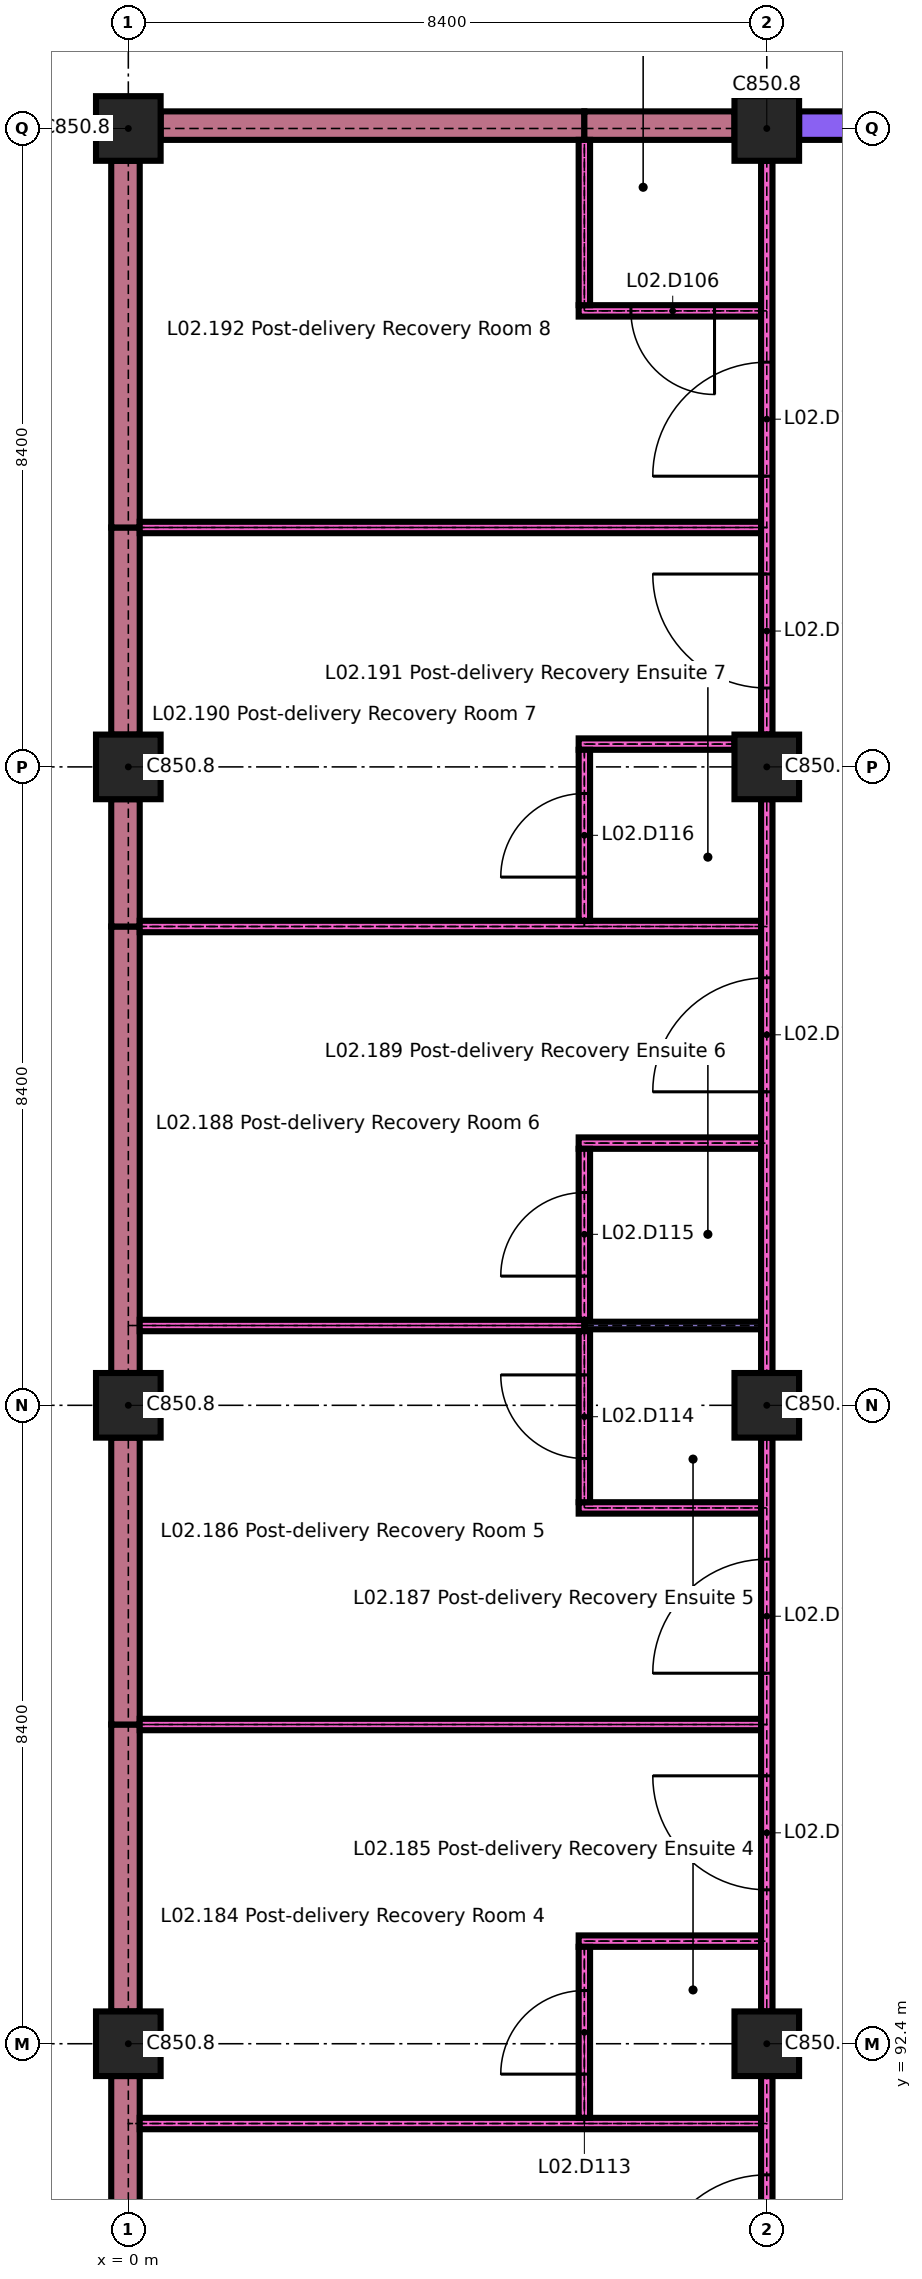
"""IFC4 building model, lengths in metres.
Left out: names, types, materials, properties, quantities, classifications, styles, units other than length and angle.
Written with IfcOpenShell. Run it as: python <this file> out.ifc"""

import sys

from ifc_helpers import new_model, si_unit, direction, frame, frame_2d, origin, origin_2d, place, context, subcontext, project, spatial, rectangle, extrude, element, fill, save


model = new_model("IFC4")
c1 = context("Model", 3, precision=1e-05, world=origin(), true_north=direction((0.0, 1.0)))
c2 = subcontext(c1, "Body", "Model", "MODEL_VIEW")
j1 = project(units=[si_unit("LENGTHUNIT", "METRE"), si_unit("PLANEANGLEUNIT", "RADIAN")], contexts=[c1])
p1 = place(None, origin())
s1 = spatial("IfcSite", under=j1, at=p1, CompositionType="ELEMENT")
p2 = place(p1, origin())
s2 = spatial("IfcBuilding", under=s1, at=p2, CompositionType="ELEMENT")
p3 = place(p2, frame((0.0, 0.0, 8.4)))
s3 = spatial("IfcBuildingStorey", under=s2, at=p3, CompositionType="ELEMENT", Elevation=8.4)
for number, where, z_axis, x_axis in (
    (1, (0.0, 92.4, 0.0), (0.0, 0.0, 1.0), (1.0, 0.0, 0.0)),
    (2, (8.4, 92.4, 0.0), (0.0, 0.0, 1.0), (1.0, 0.0, 0.0)),
    (3, (0.0, 100.8, 0.0), (0.0, 0.0, 1.0), (1.0, 0.0, 0.0)),
    (4, (8.4, 100.8, 0.0), (0.0, 0.0, 1.0), (1.0, 0.0, 0.0)),
    (5, (0.0, 109.2, 0.0), (0.0, 0.0, 1.0), (1.0, 0.0, 0.0)),
    (6, (8.4, 109.2, 0.0), (0.0, 0.0, 1.0), (1.0, 0.0, 0.0)),
    (7, (0.0, 117.6, 0.0), (0.0, 0.0, 1.0), (1.0, 0.0, 0.0)),
    (8, (8.4, 117.6, 0.0), (0.0, 0.0, 1.0), (1.0, 0.0, 0.0)),
):
    element("IfcColumn", number, at=place(p3, frame(where, z_axis=z_axis, x_axis=x_axis)), inside=s3, PredefinedType="COLUMN", context=c2, shape_type="SweptSolid", body=[
        extrude(rectangle(XDim=0.85, YDim=0.85, at=origin_2d()), origin(), (0.0, 0.0, 1.0), 4.2),
    ])
p4 = place(p3, frame((0.425, 117.637, 0.0), z_axis=(0.0, 0.0, 1.0), x_axis=(1.0, 0.0, 0.0)))
e9 = element("IfcWall", 9, at=p4, inside=s3, PredefinedType="SOLIDWALL", context=c2, shape_type="SweptSolid", body=[
    extrude(rectangle(XDim=5.575, YDim=0.375, at=frame_2d((2.788, 0.0))), origin(), (0.0, 0.0, 1.0), 3.9),
])
p5 = place(p3, frame((6.0, 117.637, 0.0), z_axis=(0.0, 0.0, 1.0), x_axis=(1.0, 0.0, 0.0)))
e10 = element("IfcWall", 10, at=p5, inside=s3, PredefinedType="SOLIDWALL", context=c2, shape_type="SweptSolid", body=[
    extrude(rectangle(XDim=1.975, YDim=0.375, at=frame_2d((0.988, 0.0))), origin(), (0.0, 0.0, 1.0), 3.9),
])
p6 = place(p3, frame((8.825, 117.637, 0.0), z_axis=(0.0, 0.0, 1.0), x_axis=(1.0, 0.0, 0.0)))
e11 = element("IfcWall", 11, at=p6, inside=s3, PredefinedType="SOLIDWALL", context=c2, shape_type="SweptSolid", body=[
    extrude(rectangle(XDim=2.575, YDim=0.375, at=frame_2d((1.288, 0.0))), origin(), (0.0, 0.0, 1.0), 4.2),
])
p7 = place(p6, frame((1.225, 0.0, 0.9)))
e12 = element("IfcOpeningElement", 12, at=p7, cuts=e11, PredefinedType="OPENING", context=c2, shape_type="SweptSolid", body=[
    extrude(rectangle(XDim=0.9, YDim=2.1, at=frame_2d((0.45, 1.05))), frame((0.0, 0.198, 0.0), z_axis=(0.0, -1.0, 0.0), x_axis=(1.0, 0.0, 0.0)), (0.0, 0.0, 1.0), 0.395),
])
p8 = place(p3, frame((-0.038, 86.1, 0.0), z_axis=(0.0, 0.0, 1.0), x_axis=(0.0, 1.0, 0.0)))
e13 = element("IfcWall", 13, at=p8, inside=s3, PredefinedType="SOLIDWALL", context=c2, shape_type="SweptSolid", body=[
    extrude(rectangle(XDim=5.875, YDim=0.375, at=frame_2d((2.938, 0.0))), origin(), (0.0, 0.0, 1.0), 3.9),
])
p9 = place(p3, frame((-0.038, 92.825, 0.0), z_axis=(0.0, 0.0, 1.0), x_axis=(0.0, 1.0, 0.0)))
e14 = element("IfcWall", 14, at=p9, inside=s3, PredefinedType="SOLIDWALL", context=c2, shape_type="SweptSolid", body=[
    extrude(rectangle(XDim=3.775, YDim=0.375, at=frame_2d((1.888, 0.0))), origin(), (0.0, 0.0, 1.0), 3.9),
])
p10 = place(p3, frame((-0.038, 96.6, 0.0), z_axis=(0.0, 0.0, 1.0), x_axis=(0.0, 1.0, 0.0)))
e15 = element("IfcWall", 15, at=p10, inside=s3, PredefinedType="SOLIDWALL", context=c2, shape_type="SweptSolid", body=[
    extrude(rectangle(XDim=3.775, YDim=0.375, at=frame_2d((1.887, 0.0))), origin(), (0.0, 0.0, 1.0), 3.9),
])
p11 = place(p3, frame((-0.038, 101.225, 0.0), z_axis=(0.0, 0.0, 1.0), x_axis=(0.0, 1.0, 0.0)))
e16 = element("IfcWall", 16, at=p11, inside=s3, PredefinedType="SOLIDWALL", context=c2, shape_type="SweptSolid", body=[
    extrude(rectangle(XDim=5.875, YDim=0.375, at=frame_2d((2.938, 0.0))), origin(), (0.0, 0.0, 1.0), 3.9),
])
p12 = place(p3, frame((-0.038, 107.1, 0.0), z_axis=(0.0, 0.0, 1.0), x_axis=(0.0, 1.0, 0.0)))
e17 = element("IfcWall", 17, at=p12, inside=s3, PredefinedType="SOLIDWALL", context=c2, shape_type="SweptSolid", body=[
    extrude(rectangle(XDim=1.675, YDim=0.375, at=frame_2d((0.837, 0.0))), origin(), (0.0, 0.0, 1.0), 3.9),
])
p13 = place(p3, frame((-0.038, 109.625, 0.0), z_axis=(0.0, 0.0, 1.0), x_axis=(0.0, 1.0, 0.0)))
e18 = element("IfcWall", 18, at=p13, inside=s3, PredefinedType="SOLIDWALL", context=c2, shape_type="SweptSolid", body=[
    extrude(rectangle(XDim=2.725, YDim=0.375, at=frame_2d((1.363, 0.0))), origin(), (0.0, 0.0, 1.0), 3.9),
])
p14 = place(p3, frame((-0.038, 112.35, 0.0), z_axis=(0.0, 0.0, 1.0), x_axis=(0.0, 1.0, 0.0)))
e19 = element("IfcWall", 19, at=p14, inside=s3, PredefinedType="SOLIDWALL", context=c2, shape_type="SweptSolid", body=[
    extrude(rectangle(XDim=4.825, YDim=0.375, at=frame_2d((2.413, 0.0))), origin(), (0.0, 0.0, 1.0), 3.9),
])
p15 = place(p3, frame((0.15, 91.35, 0.0), z_axis=(0.0, 0.0, 1.0), x_axis=(1.0, 0.0, 0.0)))
e20 = element("IfcWall", 20, at=p15, inside=s3, PredefinedType="PARTITIONING", context=c2, shape_type="SweptSolid", body=[
    extrude(rectangle(XDim=8.175, YDim=0.15, at=frame_2d((4.087, 0.0))), origin(), (0.0, 0.0, 1.0), 4.2),
])
p16 = place(p3, frame((5.925, 93.75, 0.0), z_axis=(0.0, 0.0, 1.0), x_axis=(1.0, 0.0, 0.0)))
e21 = element("IfcWall", 21, at=p16, inside=s3, PredefinedType="PARTITIONING", context=c2, shape_type="SweptSolid", body=[
    extrude(rectangle(XDim=2.4, YDim=0.15, at=frame_2d((1.2, 0.0))), origin(), (0.0, 0.0, 1.0), 4.2),
])
p17 = place(p3, frame((0.15, 96.6, 0.0), z_axis=(0.0, 0.0, 1.0), x_axis=(1.0, 0.0, 0.0)))
e22 = element("IfcWall", 22, at=p17, inside=s3, PredefinedType="PARTITIONING", context=c2, shape_type="SweptSolid", body=[
    extrude(rectangle(XDim=8.175, YDim=0.15, at=frame_2d((4.087, 0.0))), origin(), (0.0, 0.0, 1.0), 4.2),
])
p18 = place(p3, frame((5.925, 99.45, 0.0), z_axis=(0.0, 0.0, 1.0), x_axis=(1.0, 0.0, 0.0)))
e23 = element("IfcWall", 23, at=p18, inside=s3, PredefinedType="PARTITIONING", context=c2, shape_type="SweptSolid", body=[
    extrude(rectangle(XDim=2.4, YDim=0.15, at=frame_2d((1.2, 0.0))), origin(), (0.0, 0.0, 1.0), 4.2),
])
p19 = place(p3, frame((0.15, 101.85, 0.0), z_axis=(0.0, 0.0, 1.0), x_axis=(1.0, 0.0, 0.0)))
e24 = element("IfcWall", 24, at=p19, inside=s3, PredefinedType="PARTITIONING", context=c2, shape_type="SweptSolid", body=[
    extrude(rectangle(XDim=5.85, YDim=0.15, at=frame_2d((2.925, 0.0))), origin(), (0.0, 0.0, 1.0), 4.2),
])
p20 = place(p3, frame((6.0, 101.85, 0.0), z_axis=(0.0, 0.0, 1.0), x_axis=(1.0, 0.0, 0.0)))
e25 = element("IfcWall", 25, at=p20, inside=s3, PredefinedType="PARTITIONING", context=c2, shape_type="SweptSolid", body=[
    extrude(rectangle(XDim=2.325, YDim=0.1, at=frame_2d((1.163, 0.0))), origin(), (0.0, 0.0, 1.0), 4.2),
])
p21 = place(p3, frame((5.925, 104.25, 0.0), z_axis=(0.0, 0.0, 1.0), x_axis=(1.0, 0.0, 0.0)))
e26 = element("IfcWall", 26, at=p21, inside=s3, PredefinedType="PARTITIONING", context=c2, shape_type="SweptSolid", body=[
    extrude(rectangle(XDim=2.4, YDim=0.15, at=frame_2d((1.2, 0.0))), origin(), (0.0, 0.0, 1.0), 4.2),
])
p22 = place(p3, frame((0.15, 107.1, 0.0), z_axis=(0.0, 0.0, 1.0), x_axis=(1.0, 0.0, 0.0)))
e27 = element("IfcWall", 27, at=p22, inside=s3, PredefinedType="PARTITIONING", context=c2, shape_type="SweptSolid", body=[
    extrude(rectangle(XDim=8.175, YDim=0.15, at=frame_2d((4.087, 0.0))), origin(), (0.0, 0.0, 1.0), 4.2),
])
p23 = place(p3, frame((5.925, 109.5, 0.0), z_axis=(0.0, 0.0, 1.0), x_axis=(1.0, 0.0, 0.0)))
e28 = element("IfcWall", 28, at=p23, inside=s3, PredefinedType="PARTITIONING", context=c2, shape_type="SweptSolid", body=[
    extrude(rectangle(XDim=2.05, YDim=0.15, at=frame_2d((1.025, 0.0))), origin(), (0.0, 0.0, 1.0), 4.2),
])
p24 = place(p3, frame((0.15, 112.35, 0.0), z_axis=(0.0, 0.0, 1.0), x_axis=(1.0, 0.0, 0.0)))
e29 = element("IfcWall", 29, at=p24, inside=s3, PredefinedType="PARTITIONING", context=c2, shape_type="SweptSolid", body=[
    extrude(rectangle(XDim=8.175, YDim=0.15, at=frame_2d((4.087, 0.0))), origin(), (0.0, 0.0, 1.0), 4.2),
])
p25 = place(p3, frame((5.925, 115.2, 0.0), z_axis=(0.0, 0.0, 1.0), x_axis=(1.0, 0.0, 0.0)))
e30 = element("IfcWall", 30, at=p25, inside=s3, PredefinedType="PARTITIONING", context=c2, shape_type="SweptSolid", body=[
    extrude(rectangle(XDim=2.4, YDim=0.15, at=frame_2d((1.2, 0.0))), origin(), (0.0, 0.0, 1.0), 4.2),
])
p26 = place(p25, frame((0.688, 0.0, 0.0)))
e31 = element("IfcOpeningElement", 31, at=p26, cuts=e30, PredefinedType="OPENING", context=c2, shape_type="SweptSolid", body=[
    extrude(rectangle(XDim=1.1, YDim=2.1, at=frame_2d((0.55, 1.05))), frame((0.0, 0.085, 0.0), z_axis=(0.0, -1.0, 0.0), x_axis=(1.0, 0.0, 0.0)), (0.0, 0.0, 1.0), 0.17),
])
p27 = place(p3, frame((6.0, 91.425, 0.0), z_axis=(0.0, 0.0, 1.0), x_axis=(0.0, 1.0, 0.0)))
e32 = element("IfcWall", 32, at=p27, inside=s3, PredefinedType="PARTITIONING", context=c2, shape_type="SweptSolid", body=[
    extrude(rectangle(XDim=2.25, YDim=0.15, at=frame_2d((1.125, 0.0))), origin(), (0.0, 0.0, 1.0), 4.2),
])
p28 = place(p27, frame((0.575, 0.0, 0.0)))
e33 = element("IfcOpeningElement", 33, at=p28, cuts=e32, PredefinedType="OPENING", context=c2, shape_type="SweptSolid", body=[
    extrude(rectangle(XDim=1.1, YDim=2.1, at=frame_2d((0.55, 1.05))), frame((0.0, 0.085, 0.0), z_axis=(0.0, -1.0, 0.0), x_axis=(1.0, 0.0, 0.0)), (0.0, 0.0, 1.0), 0.17),
])
p29 = place(p3, frame((6.0, 99.525, 0.0), z_axis=(0.0, 0.0, 1.0), x_axis=(0.0, 1.0, 0.0)))
e34 = element("IfcWall", 34, at=p29, inside=s3, PredefinedType="PARTITIONING", context=c2, shape_type="SweptSolid", body=[
    extrude(rectangle(XDim=2.25, YDim=0.15, at=frame_2d((1.125, 0.0))), origin(), (0.0, 0.0, 1.0), 4.2),
])
p30 = place(p29, frame((0.575, 0.0, 0.0)))
e35 = element("IfcOpeningElement", 35, at=p30, cuts=e34, PredefinedType="OPENING", context=c2, shape_type="SweptSolid", body=[
    extrude(rectangle(XDim=1.1, YDim=2.1, at=frame_2d((0.55, 1.05))), frame((0.0, 0.085, 0.0), z_axis=(0.0, -1.0, 0.0), x_axis=(1.0, 0.0, 0.0)), (0.0, 0.0, 1.0), 0.17),
])
p31 = place(p3, frame((6.0, 101.925, 0.0), z_axis=(0.0, 0.0, 1.0), x_axis=(0.0, 1.0, 0.0)))
e36 = element("IfcWall", 36, at=p31, inside=s3, PredefinedType="PARTITIONING", context=c2, shape_type="SweptSolid", body=[
    extrude(rectangle(XDim=2.25, YDim=0.15, at=frame_2d((1.125, 0.0))), origin(), (0.0, 0.0, 1.0), 4.2),
])
p32 = place(p31, frame((0.575, 0.0, 0.0)))
e37 = element("IfcOpeningElement", 37, at=p32, cuts=e36, PredefinedType="OPENING", context=c2, shape_type="SweptSolid", body=[
    extrude(rectangle(XDim=1.1, YDim=2.1, at=frame_2d((0.55, 1.05))), frame((0.0, 0.085, 0.0), z_axis=(0.0, -1.0, 0.0), x_axis=(1.0, 0.0, 0.0)), (0.0, 0.0, 1.0), 0.17),
])
p33 = place(p3, frame((6.0, 107.175, 0.0), z_axis=(0.0, 0.0, 1.0), x_axis=(0.0, 1.0, 0.0)))
e38 = element("IfcWall", 38, at=p33, inside=s3, PredefinedType="PARTITIONING", context=c2, shape_type="SweptSolid", body=[
    extrude(rectangle(XDim=2.25, YDim=0.15, at=frame_2d((1.125, 0.0))), origin(), (0.0, 0.0, 1.0), 4.2),
])
p34 = place(p33, frame((0.575, 0.0, 0.0)))
e39 = element("IfcOpeningElement", 39, at=p34, cuts=e38, PredefinedType="OPENING", context=c2, shape_type="SweptSolid", body=[
    extrude(rectangle(XDim=1.1, YDim=2.1, at=frame_2d((0.55, 1.05))), frame((0.0, 0.085, 0.0), z_axis=(0.0, -1.0, 0.0), x_axis=(1.0, 0.0, 0.0)), (0.0, 0.0, 1.0), 0.17),
])
p35 = place(p3, frame((6.0, 115.275, 0.0), z_axis=(0.0, 0.0, 1.0), x_axis=(0.0, 1.0, 0.0)))
e40 = element("IfcWall", 40, at=p35, inside=s3, PredefinedType="PARTITIONING", context=c2, shape_type="SweptSolid", body=[
    extrude(rectangle(XDim=2.175, YDim=0.15, at=frame_2d((1.087, 0.0))), origin(), (0.0, 0.0, 1.0), 4.2),
])
p36 = place(p3, frame((8.4, 84.425, 0.0), z_axis=(0.0, 0.0, 1.0), x_axis=(0.0, 1.0, 0.0)))
e41 = element("IfcWall", 41, at=p36, inside=s3, PredefinedType="PARTITIONING", context=c2, shape_type="SweptSolid", body=[
    extrude(rectangle(XDim=7.55, YDim=0.15, at=frame_2d((3.775, 0.0))), origin(), (0.0, 0.0, 1.0), 4.2),
])
p37 = place(p36, frame((4.75, 0.0, 0.0)))
e42 = element("IfcOpeningElement", 42, at=p37, cuts=e41, PredefinedType="OPENING", context=c2, shape_type="SweptSolid", body=[
    extrude(rectangle(XDim=1.5, YDim=2.4, at=frame_2d((0.75, 1.2))), frame((0.0, 0.085, 0.0), z_axis=(0.0, -1.0, 0.0), x_axis=(1.0, 0.0, 0.0)), (0.0, 0.0, 1.0), 0.17),
])
p38 = place(p3, frame((8.4, 92.825, 0.0), z_axis=(0.0, 0.0, 1.0), x_axis=(0.0, 1.0, 0.0)))
e43 = element("IfcWall", 43, at=p38, inside=s3, PredefinedType="PARTITIONING", context=c2, shape_type="SweptSolid", body=[
    extrude(rectangle(XDim=7.55, YDim=0.15, at=frame_2d((3.775, 0.0))), origin(), (0.0, 0.0, 1.0), 4.2),
])
p39 = place(p38, frame((1.6, 0.0, 0.0)))
e44 = element("IfcOpeningElement", 44, at=p39, cuts=e43, PredefinedType="OPENING", context=c2, shape_type="SweptSolid", body=[
    extrude(rectangle(XDim=1.5, YDim=2.4, at=frame_2d((0.75, 1.2))), frame((0.0, 0.085, 0.0), z_axis=(0.0, -1.0, 0.0), x_axis=(1.0, 0.0, 0.0)), (0.0, 0.0, 1.0), 0.17),
])
p40 = place(p38, frame((4.45, 0.0, 0.0)))
e45 = element("IfcOpeningElement", 45, at=p40, cuts=e43, PredefinedType="OPENING", context=c2, shape_type="SweptSolid", body=[
    extrude(rectangle(XDim=1.5, YDim=2.4, at=frame_2d((0.75, 1.2))), frame((0.0, 0.085, 0.0), z_axis=(0.0, -1.0, 0.0), x_axis=(1.0, 0.0, 0.0)), (0.0, 0.0, 1.0), 0.17),
])
p41 = place(p3, frame((8.4, 101.225, 0.0), z_axis=(0.0, 0.0, 1.0), x_axis=(0.0, 1.0, 0.0)))
e46 = element("IfcWall", 46, at=p41, inside=s3, PredefinedType="PARTITIONING", context=c2, shape_type="SweptSolid", body=[
    extrude(rectangle(XDim=7.55, YDim=0.15, at=frame_2d((3.775, 0.0))), origin(), (0.0, 0.0, 1.0), 4.2),
])
p42 = place(p41, frame((3.7, 0.0, 0.0)))
e47 = element("IfcOpeningElement", 47, at=p42, cuts=e46, PredefinedType="OPENING", context=c2, shape_type="SweptSolid", body=[
    extrude(rectangle(XDim=1.5, YDim=2.4, at=frame_2d((0.75, 1.2))), frame((0.0, 0.085, 0.0), z_axis=(0.0, -1.0, 0.0), x_axis=(1.0, 0.0, 0.0)), (0.0, 0.0, 1.0), 0.17),
])
p43 = place(p3, frame((8.4, 109.625, 0.0), z_axis=(0.0, 0.0, 1.0), x_axis=(0.0, 1.0, 0.0)))
e48 = element("IfcWall", 48, at=p43, inside=s3, PredefinedType="PARTITIONING", context=c2, shape_type="SweptSolid", body=[
    extrude(rectangle(XDim=7.55, YDim=0.15, at=frame_2d((3.775, 0.0))), origin(), (0.0, 0.0, 1.0), 4.2),
])
p44 = place(p43, frame((0.613, 0.0, 0.0)))
e49 = element("IfcOpeningElement", 49, at=p44, cuts=e48, PredefinedType="OPENING", context=c2, shape_type="SweptSolid", body=[
    extrude(rectangle(XDim=1.5, YDim=2.4, at=frame_2d((0.75, 1.2))), frame((0.0, 0.085, 0.0), z_axis=(0.0, -1.0, 0.0), x_axis=(1.0, 0.0, 0.0)), (0.0, 0.0, 1.0), 0.17),
])
p45 = place(p43, frame((3.4, 0.0, 0.0)))
e50 = element("IfcOpeningElement", 50, at=p45, cuts=e48, PredefinedType="OPENING", context=c2, shape_type="SweptSolid", body=[
    extrude(rectangle(XDim=1.5, YDim=2.4, at=frame_2d((0.75, 1.2))), frame((0.0, 0.085, 0.0), z_axis=(0.0, -1.0, 0.0), x_axis=(1.0, 0.0, 0.0)), (0.0, 0.0, 1.0), 0.17),
])
p46 = place(p26, origin())
e51 = element("IfcDoor", 51, at=p46, inside=s3, OperationType="SINGLE_SWING_RIGHT", PredefinedType="DOOR", context=c2, shape_type="SweptSolid", body=[
    extrude(rectangle(XDim=1.1, YDim=2.1, at=frame_2d((0.55, 1.05))), frame((0.0, 0.025, 0.0), z_axis=(0.0, -1.0, 0.0), x_axis=(1.0, 0.0, 0.0)), (0.0, 0.0, 1.0), 0.05),
])
fill(e31, e51)
p47 = place(p28, origin())
e52 = element("IfcDoor", 52, at=p47, inside=s3, OperationType="SINGLE_SWING_RIGHT", PredefinedType="DOOR", context=c2, shape_type="SweptSolid", body=[
    extrude(rectangle(XDim=1.1, YDim=2.1, at=frame_2d((0.55, 1.05))), frame((0.0, 0.025, 0.0), z_axis=(0.0, -1.0, 0.0), x_axis=(1.0, 0.0, 0.0)), (0.0, 0.0, 1.0), 0.05),
])
fill(e33, e52)
p48 = place(p30, origin())
e53 = element("IfcDoor", 53, at=p48, inside=s3, OperationType="SINGLE_SWING_LEFT", PredefinedType="DOOR", context=c2, shape_type="SweptSolid", body=[
    extrude(rectangle(XDim=1.1, YDim=2.1, at=frame_2d((0.55, 1.05))), frame((0.0, 0.025, 0.0), z_axis=(0.0, -1.0, 0.0), x_axis=(1.0, 0.0, 0.0)), (0.0, 0.0, 1.0), 0.05),
])
fill(e35, e53)
p49 = place(p32, origin())
e54 = element("IfcDoor", 54, at=p49, inside=s3, OperationType="SINGLE_SWING_RIGHT", PredefinedType="DOOR", context=c2, shape_type="SweptSolid", body=[
    extrude(rectangle(XDim=1.1, YDim=2.1, at=frame_2d((0.55, 1.05))), frame((0.0, 0.025, 0.0), z_axis=(0.0, -1.0, 0.0), x_axis=(1.0, 0.0, 0.0)), (0.0, 0.0, 1.0), 0.05),
])
fill(e37, e54)
p50 = place(p34, origin())
e55 = element("IfcDoor", 55, at=p50, inside=s3, OperationType="SINGLE_SWING_RIGHT", PredefinedType="DOOR", context=c2, shape_type="SweptSolid", body=[
    extrude(rectangle(XDim=1.1, YDim=2.1, at=frame_2d((0.55, 1.05))), frame((0.0, 0.025, 0.0), z_axis=(0.0, -1.0, 0.0), x_axis=(1.0, 0.0, 0.0)), (0.0, 0.0, 1.0), 0.05),
])
fill(e39, e55)
p51 = place(p37, origin())
e56 = element("IfcDoor", 56, at=p51, inside=s3, OperationType="SINGLE_SWING_RIGHT", PredefinedType="DOOR", context=c2, shape_type="SweptSolid", body=[
    extrude(rectangle(XDim=1.5, YDim=2.4, at=frame_2d((0.75, 1.2))), frame((0.0, 0.03, 0.0), z_axis=(0.0, -1.0, 0.0), x_axis=(1.0, 0.0, 0.0)), (0.0, 0.0, 1.0), 0.06),
])
fill(e42, e56)
p52 = place(p39, origin())
e57 = element("IfcDoor", 57, at=p52, inside=s3, OperationType="SINGLE_SWING_LEFT", PredefinedType="DOOR", context=c2, shape_type="SweptSolid", body=[
    extrude(rectangle(XDim=1.5, YDim=2.4, at=frame_2d((0.75, 1.2))), frame((0.0, 0.03, 0.0), z_axis=(0.0, -1.0, 0.0), x_axis=(1.0, 0.0, 0.0)), (0.0, 0.0, 1.0), 0.06),
])
fill(e44, e57)
p53 = place(p40, origin())
e58 = element("IfcDoor", 58, at=p53, inside=s3, OperationType="SINGLE_SWING_RIGHT", PredefinedType="DOOR", context=c2, shape_type="SweptSolid", body=[
    extrude(rectangle(XDim=1.5, YDim=2.4, at=frame_2d((0.75, 1.2))), frame((0.0, 0.03, 0.0), z_axis=(0.0, -1.0, 0.0), x_axis=(1.0, 0.0, 0.0)), (0.0, 0.0, 1.0), 0.06),
])
fill(e45, e58)
p54 = place(p42, origin())
e59 = element("IfcDoor", 59, at=p54, inside=s3, OperationType="SINGLE_SWING_RIGHT", PredefinedType="DOOR", context=c2, shape_type="SweptSolid", body=[
    extrude(rectangle(XDim=1.5, YDim=2.4, at=frame_2d((0.75, 1.2))), frame((0.0, 0.03, 0.0), z_axis=(0.0, -1.0, 0.0), x_axis=(1.0, 0.0, 0.0)), (0.0, 0.0, 1.0), 0.06),
])
fill(e47, e59)
p55 = place(p44, origin())
e60 = element("IfcDoor", 60, at=p55, inside=s3, OperationType="SINGLE_SWING_LEFT", PredefinedType="DOOR", context=c2, shape_type="SweptSolid", body=[
    extrude(rectangle(XDim=1.5, YDim=2.4, at=frame_2d((0.75, 1.2))), frame((0.0, 0.03, 0.0), z_axis=(0.0, -1.0, 0.0), x_axis=(1.0, 0.0, 0.0)), (0.0, 0.0, 1.0), 0.06),
])
fill(e49, e60)
p56 = place(p45, origin())
e61 = element("IfcDoor", 61, at=p56, inside=s3, OperationType="SINGLE_SWING_RIGHT", PredefinedType="DOOR", context=c2, shape_type="SweptSolid", body=[
    extrude(rectangle(XDim=1.5, YDim=2.4, at=frame_2d((0.75, 1.2))), frame((0.0, 0.03, 0.0), z_axis=(0.0, -1.0, 0.0), x_axis=(1.0, 0.0, 0.0)), (0.0, 0.0, 1.0), 0.06),
])
fill(e50, e61)
save(model, sys.argv[1])
